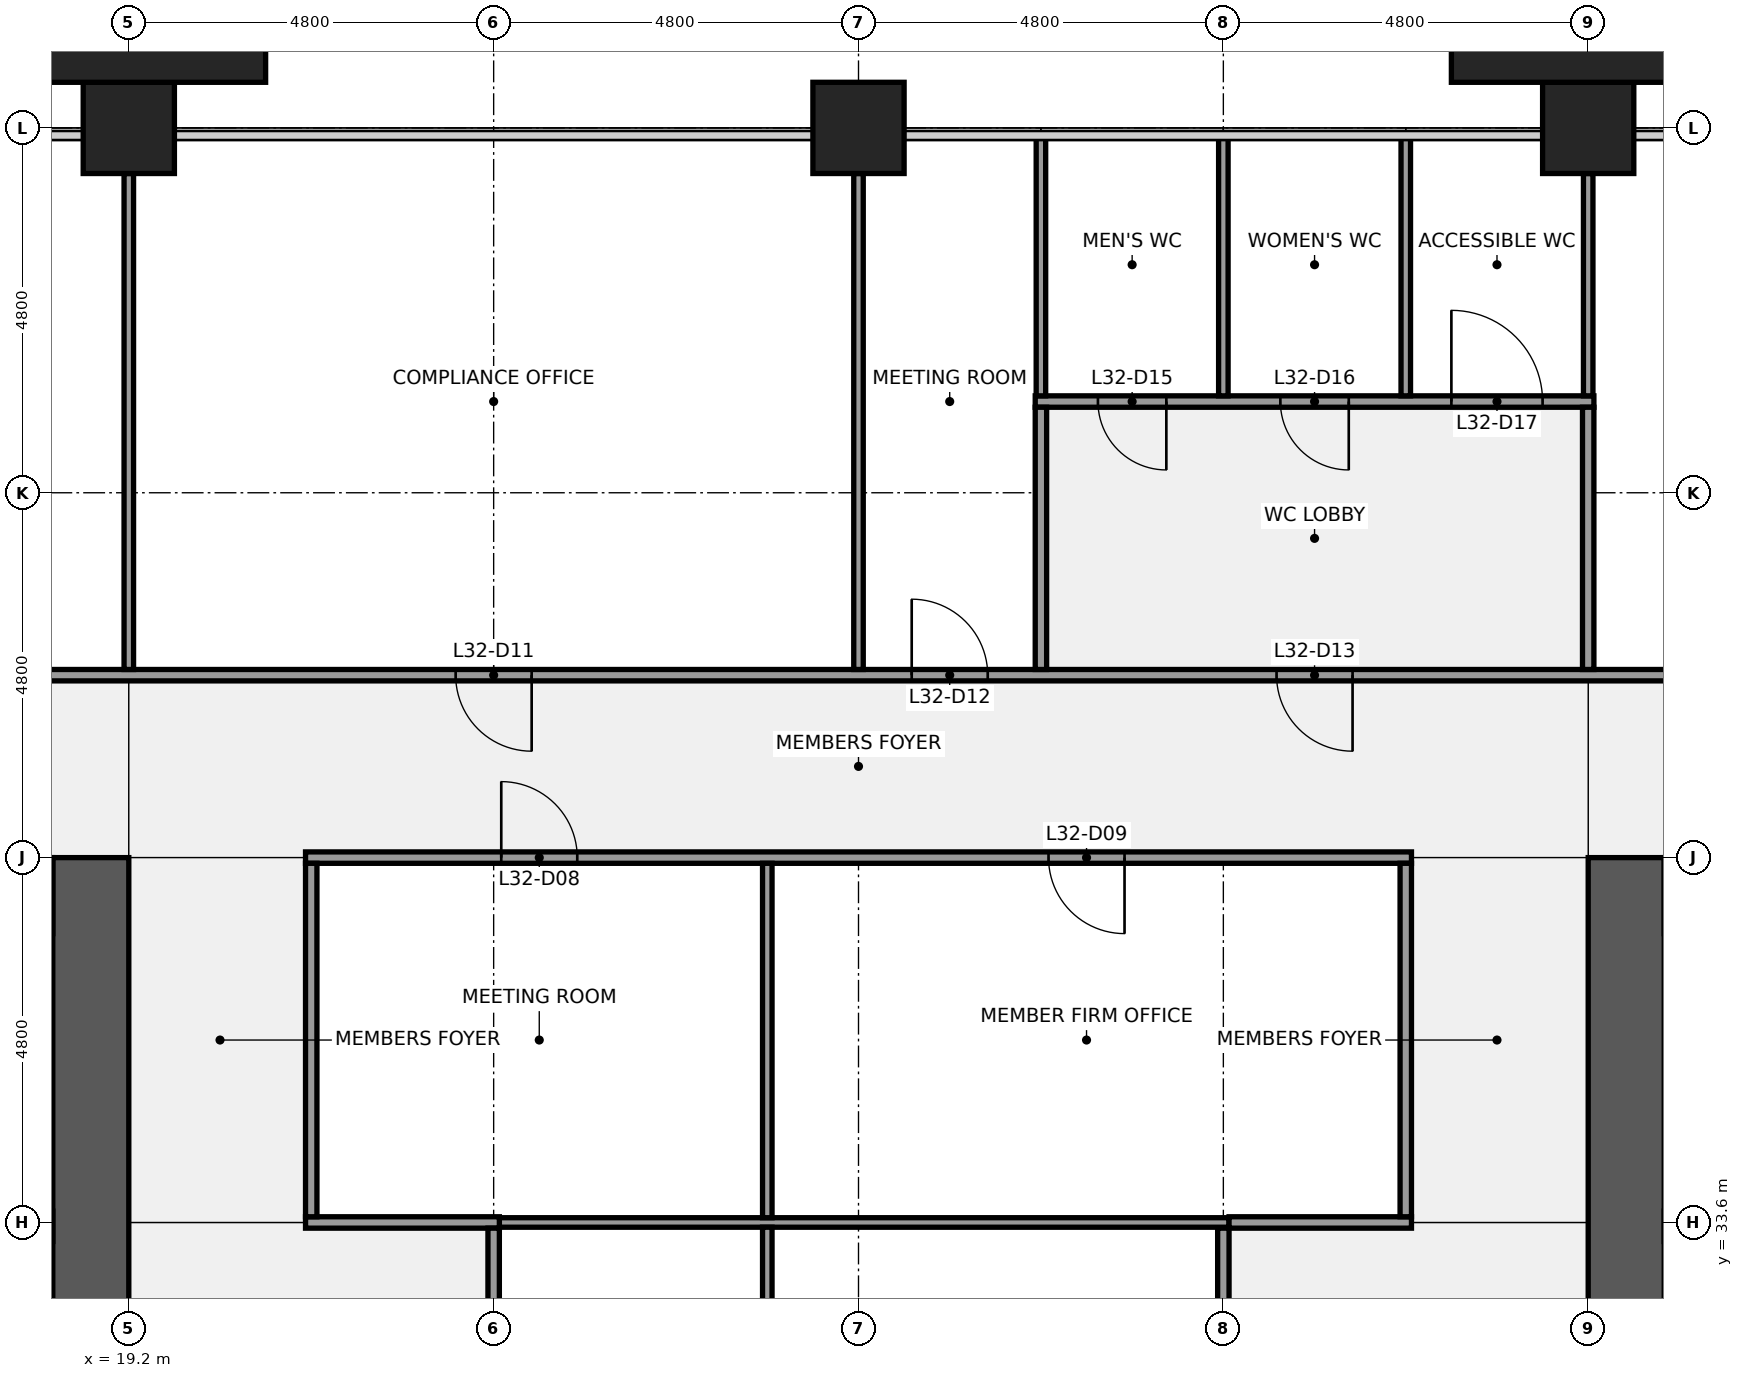
"""IFC4 building model, lengths in metres.
Left out: names, types, materials, properties, quantities, classifications, styles, units other than length and angle.
Written with IfcOpenShell. Run it as: python <this file> out.ifc"""

import sys

from ifc_helpers import new_model, si_unit, direction, frame, frame_2d, origin, origin_2d, place, context, subcontext, project, spatial, rectangle, extrude, element, fill, save


model = new_model("IFC4")
c1 = context("Model", 3, precision=1e-05, world=origin(), true_north=direction((0.0, 1.0)))
c2 = subcontext(c1, "Body", "Model", "MODEL_VIEW")
j1 = project(units=[si_unit("LENGTHUNIT", "METRE"), si_unit("PLANEANGLEUNIT", "RADIAN")], contexts=[c1])
p1 = place(None, origin())
s1 = spatial("IfcSite", under=j1, at=p1, CompositionType="ELEMENT")
p2 = place(p1, origin())
s2 = spatial("IfcBuilding", under=s1, at=p2, CompositionType="ELEMENT")
p3 = place(p2, frame((0.0, 0.0, 148.1)))
s3 = spatial("IfcBuildingStorey", under=s2, at=p3, CompositionType="ELEMENT", Elevation=148.1)
for number, where, z_axis, x_axis in (
    (1, (19.2, 48.0, 0.0), (0.0, 0.0, 1.0), (1.0, 0.0, 0.0)),
    (2, (28.8, 48.0, 0.0), (0.0, 0.0, 1.0), (1.0, 0.0, 0.0)),
    (3, (38.4, 48.0, 0.0), (0.0, 0.0, 1.0), (1.0, 0.0, 0.0)),
):
    element("IfcColumn", number, at=place(p3, frame(where, z_axis=z_axis, x_axis=x_axis)), inside=s3, PredefinedType="COLUMN", context=c2, shape_type="SweptSolid", body=[
        extrude(rectangle(XDim=1.2, YDim=1.2, at=origin_2d()), origin(), (0.0, 0.0, 1.0), 4.0),
    ])
p4 = place(p3, frame((18.7, 38.4, 0.0), z_axis=(0.0, 0.0, 1.0), x_axis=(0.0, -1.0, 0.0)))
e4 = element("IfcWall", 4, at=p4, inside=s3, PredefinedType="SHEAR", context=c2, shape_type="SweptSolid", body=[
    extrude(rectangle(XDim=28.8, YDim=1.0, at=frame_2d((14.4, 0.0))), origin(), (0.0, 0.0, 1.0), 3.84),
])
p5 = place(p4, frame((18.3, 0.0, 0.0)))
e5 = element("IfcOpeningElement", 5, at=p5, cuts=e4, PredefinedType="OPENING", context=c2, shape_type="SweptSolid", body=[
    extrude(rectangle(XDim=1.8, YDim=2.1, at=frame_2d((0.9, 1.05))), frame((0.0, 0.51, 0.0), z_axis=(0.0, -1.0, 0.0), x_axis=(1.0, 0.0, 0.0)), (0.0, 0.0, 1.0), 1.02),
])
p6 = place(p4, frame((8.7, 0.0, 0.0)))
e6 = element("IfcOpeningElement", 6, at=p6, cuts=e4, PredefinedType="OPENING", context=c2, shape_type="SweptSolid", body=[
    extrude(rectangle(XDim=1.8, YDim=2.1, at=frame_2d((0.9, 1.05))), frame((0.0, 0.51, 0.0), z_axis=(0.0, -1.0, 0.0), x_axis=(1.0, 0.0, 0.0)), (0.0, 0.0, 1.0), 1.02),
])
p7 = place(p3, frame((1.0, 33.55, 0.0), z_axis=(0.0, 0.0, 1.0), x_axis=(1.0, 0.0, 0.0)))
e7 = element("IfcWall", 7, at=p7, inside=s3, PredefinedType="SHEAR", context=c2, shape_type="SweptSolid", body=[
    extrude(rectangle(XDim=17.2, YDim=0.4, at=frame_2d((8.6, 0.0))), origin(), (0.0, 0.0, 1.0), 3.84),
])
p8 = place(p3, frame((38.9, 9.6, 0.0), z_axis=(0.0, 0.0, 1.0), x_axis=(0.0, 1.0, 0.0)))
e8 = element("IfcWall", 8, at=p8, inside=s3, PredefinedType="SHEAR", context=c2, shape_type="SweptSolid", body=[
    extrude(rectangle(XDim=28.8, YDim=1.0, at=frame_2d((14.4, 0.0))), origin(), (0.0, 0.0, 1.0), 3.84),
])
p9 = place(p8, frame((8.7, 0.0, 0.0)))
e9 = element("IfcOpeningElement", 9, at=p9, cuts=e8, PredefinedType="OPENING", context=c2, shape_type="SweptSolid", body=[
    extrude(rectangle(XDim=1.8, YDim=2.1, at=frame_2d((0.9, 1.05))), frame((0.0, 0.51, 0.0), z_axis=(0.0, -1.0, 0.0), x_axis=(1.0, 0.0, 0.0)), (0.0, 0.0, 1.0), 1.02),
])
p10 = place(p8, frame((18.3, 0.0, 0.0)))
e10 = element("IfcOpeningElement", 10, at=p10, cuts=e8, PredefinedType="OPENING", context=c2, shape_type="SweptSolid", body=[
    extrude(rectangle(XDim=1.8, YDim=2.1, at=frame_2d((0.9, 1.05))), frame((0.0, 0.51, 0.0), z_axis=(0.0, -1.0, 0.0), x_axis=(1.0, 0.0, 0.0)), (0.0, 0.0, 1.0), 1.02),
])
p11 = place(p3, frame((24.075, 33.6, 0.0), z_axis=(0.0, 0.0, 1.0), x_axis=(1.0, 0.0, 0.0)))
e11 = element("IfcWall", 11, at=p11, inside=s3, PredefinedType="PARTITIONING", context=c2, shape_type="SweptSolid", body=[
    extrude(rectangle(XDim=9.6, YDim=0.125, at=frame_2d((4.8, 0.0))), origin(), (0.0, 0.0, 1.0), 2.849),
])
p12 = place(p3, frame((21.525, 33.6, 0.0), z_axis=(0.0, 0.0, 1.0), x_axis=(1.0, 0.0, 0.0)))
e12 = element("IfcWall", 12, at=p12, inside=s3, PredefinedType="PARTITIONING", context=c2, shape_type="SweptSolid", body=[
    extrude(rectangle(XDim=2.55, YDim=0.15, at=frame_2d((1.275, 0.0))), origin(), (0.0, 0.0, 1.0), 2.849),
])
p13 = place(p3, frame((33.675, 33.6, 0.0), z_axis=(0.0, 0.0, 1.0), x_axis=(1.0, 0.0, 0.0)))
e13 = element("IfcWall", 13, at=p13, inside=s3, PredefinedType="PARTITIONING", context=c2, shape_type="SweptSolid", body=[
    extrude(rectangle(XDim=2.4, YDim=0.15, at=frame_2d((1.2, 0.0))), origin(), (0.0, 0.0, 1.0), 2.849),
])
p14 = place(p3, frame((21.525, 38.4, 0.0), z_axis=(0.0, 0.0, 1.0), x_axis=(1.0, 0.0, 0.0)))
e14 = element("IfcWall", 14, at=p14, inside=s3, PredefinedType="PARTITIONING", context=c2, shape_type="SweptSolid", body=[
    extrude(rectangle(XDim=14.55, YDim=0.15, at=frame_2d((7.275, 0.0))), origin(), (0.0, 0.0, 1.0), 2.849),
])
p15 = place(p14, frame((2.575, 0.0, 0.0)))
e15 = element("IfcOpeningElement", 15, at=p15, cuts=e14, PredefinedType="OPENING", context=c2, shape_type="SweptSolid", body=[
    extrude(rectangle(XDim=1.0, YDim=2.1, at=frame_2d((0.5, 1.05))), frame((0.0, 0.085, 0.0), z_axis=(0.0, -1.0, 0.0), x_axis=(1.0, 0.0, 0.0)), (0.0, 0.0, 1.0), 0.17),
])
p16 = place(p14, frame((9.775, 0.0, 0.0)))
e16 = element("IfcOpeningElement", 16, at=p16, cuts=e14, PredefinedType="OPENING", context=c2, shape_type="SweptSolid", body=[
    extrude(rectangle(XDim=1.0, YDim=2.1, at=frame_2d((0.5, 1.05))), frame((0.0, 0.085, 0.0), z_axis=(0.0, -1.0, 0.0), x_axis=(1.0, 0.0, 0.0)), (0.0, 0.0, 1.0), 0.17),
])
p17 = place(p3, frame((14.325, 40.8, 0.0), z_axis=(0.0, 0.0, 1.0), x_axis=(1.0, 0.0, 0.0)))
e17 = element("IfcWall", 17, at=p17, inside=s3, PredefinedType="PARTITIONING", context=c2, shape_type="SweptSolid", body=[
    extrude(rectangle(XDim=28.95, YDim=0.15, at=frame_2d((14.475, 0.0))), origin(), (0.0, 0.0, 1.0), 2.849),
])
p18 = place(p17, frame((1.975, 0.0, 0.0)))
e18 = element("IfcOpeningElement", 18, at=p18, cuts=e17, PredefinedType="OPENING", context=c2, shape_type="SweptSolid", body=[
    extrude(rectangle(XDim=1.0, YDim=2.1, at=frame_2d((0.5, 1.05))), frame((0.0, 0.085, 0.0), z_axis=(0.0, -1.0, 0.0), x_axis=(1.0, 0.0, 0.0)), (0.0, 0.0, 1.0), 0.17),
])
p19 = place(p17, frame((9.175, 0.0, 0.0)))
e19 = element("IfcOpeningElement", 19, at=p19, cuts=e17, PredefinedType="OPENING", context=c2, shape_type="SweptSolid", body=[
    extrude(rectangle(XDim=1.0, YDim=2.1, at=frame_2d((0.5, 1.05))), frame((0.0, 0.085, 0.0), z_axis=(0.0, -1.0, 0.0), x_axis=(1.0, 0.0, 0.0)), (0.0, 0.0, 1.0), 0.17),
])
p20 = place(p17, frame((15.175, 0.0, 0.0)))
e20 = element("IfcOpeningElement", 20, at=p20, cuts=e17, PredefinedType="OPENING", context=c2, shape_type="SweptSolid", body=[
    extrude(rectangle(XDim=1.0, YDim=2.1, at=frame_2d((0.5, 1.05))), frame((0.0, 0.085, 0.0), z_axis=(0.0, -1.0, 0.0), x_axis=(1.0, 0.0, 0.0)), (0.0, 0.0, 1.0), 0.17),
])
p21 = place(p17, frame((19.975, 0.0, 0.0)))
e21 = element("IfcOpeningElement", 21, at=p21, cuts=e17, PredefinedType="OPENING", context=c2, shape_type="SweptSolid", body=[
    extrude(rectangle(XDim=1.0, YDim=2.1, at=frame_2d((0.5, 1.05))), frame((0.0, 0.085, 0.0), z_axis=(0.0, -1.0, 0.0), x_axis=(1.0, 0.0, 0.0)), (0.0, 0.0, 1.0), 0.17),
])
p22 = place(p17, frame((25.975, 0.0, 0.0)))
e22 = element("IfcOpeningElement", 22, at=p22, cuts=e17, PredefinedType="OPENING", context=c2, shape_type="SweptSolid", body=[
    extrude(rectangle(XDim=1.0, YDim=2.1, at=frame_2d((0.5, 1.05))), frame((0.0, 0.085, 0.0), z_axis=(0.0, -1.0, 0.0), x_axis=(1.0, 0.0, 0.0)), (0.0, 0.0, 1.0), 0.17),
])
p23 = place(p3, frame((31.125, 44.4, 0.0), z_axis=(0.0, 0.0, 1.0), x_axis=(1.0, 0.0, 0.0)))
e23 = element("IfcWall", 23, at=p23, inside=s3, PredefinedType="PARTITIONING", context=c2, shape_type="SweptSolid", body=[
    extrude(rectangle(XDim=7.35, YDim=0.15, at=frame_2d((3.675, 0.0))), origin(), (0.0, 0.0, 1.0), 2.849),
])
p24 = place(p23, frame((0.825, 0.0, 0.0)))
e24 = element("IfcOpeningElement", 24, at=p24, cuts=e23, PredefinedType="OPENING", context=c2, shape_type="SweptSolid", body=[
    extrude(rectangle(XDim=0.9, YDim=2.1, at=frame_2d((0.45, 1.05))), frame((0.0, 0.085, 0.0), z_axis=(0.0, -1.0, 0.0), x_axis=(1.0, 0.0, 0.0)), (0.0, 0.0, 1.0), 0.17),
])
p25 = place(p23, frame((3.225, 0.0, 0.0)))
e25 = element("IfcOpeningElement", 25, at=p25, cuts=e23, PredefinedType="OPENING", context=c2, shape_type="SweptSolid", body=[
    extrude(rectangle(XDim=0.9, YDim=2.1, at=frame_2d((0.45, 1.05))), frame((0.0, 0.085, 0.0), z_axis=(0.0, -1.0, 0.0), x_axis=(1.0, 0.0, 0.0)), (0.0, 0.0, 1.0), 0.17),
])
p26 = place(p23, frame((5.475, 0.0, 0.0)))
e26 = element("IfcOpeningElement", 26, at=p26, cuts=e23, PredefinedType="OPENING", context=c2, shape_type="SweptSolid", body=[
    extrude(rectangle(XDim=1.2, YDim=2.1, at=frame_2d((0.6, 1.05))), frame((0.0, 0.085, 0.0), z_axis=(0.0, -1.0, 0.0), x_axis=(1.0, 0.0, 0.0)), (0.0, 0.0, 1.0), 0.17),
])
p27 = place(p3, frame((19.2, 40.875, 0.0), z_axis=(0.0, 0.0, 1.0), x_axis=(0.0, 1.0, 0.0)))
e27 = element("IfcWall", 27, at=p27, inside=s3, PredefinedType="PARTITIONING", context=c2, shape_type="SweptSolid", body=[
    extrude(rectangle(XDim=6.525, YDim=0.125, at=frame_2d((3.262, 0.0))), origin(), (0.0, 0.0, 1.0), 2.849),
])
p28 = place(p3, frame((21.6, 33.675, 0.0), z_axis=(0.0, 0.0, 1.0), x_axis=(0.0, 1.0, 0.0)))
e28 = element("IfcWall", 28, at=p28, inside=s3, PredefinedType="PARTITIONING", context=c2, shape_type="SweptSolid", body=[
    extrude(rectangle(XDim=4.65, YDim=0.15, at=frame_2d((2.325, 0.0))), origin(), (0.0, 0.0, 1.0), 2.849),
])
p29 = place(p3, frame((24.0, 21.675, 0.0), z_axis=(0.0, 0.0, 1.0), x_axis=(0.0, 1.0, 0.0)))
e29 = element("IfcWall", 29, at=p29, inside=s3, PredefinedType="PARTITIONING", context=c2, shape_type="SweptSolid", body=[
    extrude(rectangle(XDim=11.85, YDim=0.15, at=frame_2d((5.925, 0.0))), origin(), (0.0, 0.0, 1.0), 2.849),
])
p30 = place(p29, frame((5.425, 0.0, 0.0)))
e30 = element("IfcOpeningElement", 30, at=p30, cuts=e29, PredefinedType="OPENING", context=c2, shape_type="SweptSolid", body=[
    extrude(rectangle(XDim=1.0, YDim=2.1, at=frame_2d((0.5, 1.05))), frame((0.0, 0.085, 0.0), z_axis=(0.0, -1.0, 0.0), x_axis=(1.0, 0.0, 0.0)), (0.0, 0.0, 1.0), 0.17),
])
p31 = place(p3, frame((27.6, 21.675, 0.0), z_axis=(0.0, 0.0, 1.0), x_axis=(0.0, 1.0, 0.0)))
e31 = element("IfcWall", 31, at=p31, inside=s3, PredefinedType="PARTITIONING", context=c2, shape_type="SweptSolid", body=[
    extrude(rectangle(XDim=11.863, YDim=0.125, at=frame_2d((5.931, 0.0))), origin(), (0.0, 0.0, 1.0), 2.849),
])
p32 = place(p3, frame((27.6, 33.663, 0.0), z_axis=(0.0, 0.0, 1.0), x_axis=(0.0, 1.0, 0.0)))
e32 = element("IfcWall", 32, at=p32, inside=s3, PredefinedType="PARTITIONING", context=c2, shape_type="SweptSolid", body=[
    extrude(rectangle(XDim=4.662, YDim=0.125, at=frame_2d((2.331, 0.0))), origin(), (0.0, 0.0, 1.0), 2.849),
])
p33 = place(p3, frame((28.8, 40.875, 0.0), z_axis=(0.0, 0.0, 1.0), x_axis=(0.0, 1.0, 0.0)))
e33 = element("IfcWall", 33, at=p33, inside=s3, PredefinedType="PARTITIONING", context=c2, shape_type="SweptSolid", body=[
    extrude(rectangle(XDim=6.525, YDim=0.125, at=frame_2d((3.262, 0.0))), origin(), (0.0, 0.0, 1.0), 2.849),
])
p34 = place(p3, frame((31.2, 44.475, 0.0), z_axis=(0.0, 0.0, 1.0), x_axis=(0.0, 1.0, 0.0)))
e34 = element("IfcWall", 34, at=p34, inside=s3, PredefinedType="PARTITIONING", context=c2, shape_type="SweptSolid", body=[
    extrude(rectangle(XDim=3.425, YDim=0.125, at=frame_2d((1.712, 0.0))), origin(), (0.0, 0.0, 1.0), 2.849),
])
p35 = place(p3, frame((31.2, 40.875, 0.0), z_axis=(0.0, 0.0, 1.0), x_axis=(0.0, 1.0, 0.0)))
e35 = element("IfcWall", 35, at=p35, inside=s3, PredefinedType="PARTITIONING", context=c2, shape_type="SweptSolid", body=[
    extrude(rectangle(XDim=3.45, YDim=0.15, at=frame_2d((1.725, 0.0))), origin(), (0.0, 0.0, 1.0), 2.849),
])
p36 = place(p3, frame((33.6, 44.475, 0.0), z_axis=(0.0, 0.0, 1.0), x_axis=(0.0, 1.0, 0.0)))
e36 = element("IfcWall", 36, at=p36, inside=s3, PredefinedType="PARTITIONING", context=c2, shape_type="SweptSolid", body=[
    extrude(rectangle(XDim=3.425, YDim=0.125, at=frame_2d((1.712, 0.0))), origin(), (0.0, 0.0, 1.0), 2.849),
])
p37 = place(p3, frame((33.6, 21.675, 0.0), z_axis=(0.0, 0.0, 1.0), x_axis=(0.0, 1.0, 0.0)))
e37 = element("IfcWall", 37, at=p37, inside=s3, PredefinedType="PARTITIONING", context=c2, shape_type="SweptSolid", body=[
    extrude(rectangle(XDim=11.85, YDim=0.15, at=frame_2d((5.925, 0.0))), origin(), (0.0, 0.0, 1.0), 2.849),
])
p38 = place(p37, frame((5.425, 0.0, 0.0)))
e38 = element("IfcOpeningElement", 38, at=p38, cuts=e37, PredefinedType="OPENING", context=c2, shape_type="SweptSolid", body=[
    extrude(rectangle(XDim=1.0, YDim=2.1, at=frame_2d((0.5, 1.05))), frame((0.0, 0.085, 0.0), z_axis=(0.0, -1.0, 0.0), x_axis=(1.0, 0.0, 0.0)), (0.0, 0.0, 1.0), 0.17),
])
p39 = place(p3, frame((36.0, 44.475, 0.0), z_axis=(0.0, 0.0, 1.0), x_axis=(0.0, 1.0, 0.0)))
e39 = element("IfcWall", 39, at=p39, inside=s3, PredefinedType="PARTITIONING", context=c2, shape_type="SweptSolid", body=[
    extrude(rectangle(XDim=3.425, YDim=0.125, at=frame_2d((1.712, 0.0))), origin(), (0.0, 0.0, 1.0), 2.849),
])
p40 = place(p3, frame((36.0, 33.675, 0.0), z_axis=(0.0, 0.0, 1.0), x_axis=(0.0, 1.0, 0.0)))
e40 = element("IfcWall", 40, at=p40, inside=s3, PredefinedType="PARTITIONING", context=c2, shape_type="SweptSolid", body=[
    extrude(rectangle(XDim=4.65, YDim=0.15, at=frame_2d((2.325, 0.0))), origin(), (0.0, 0.0, 1.0), 2.849),
])
p41 = place(p3, frame((38.4, 44.475, 0.0), z_axis=(0.0, 0.0, 1.0), x_axis=(0.0, 1.0, 0.0)))
e41 = element("IfcWall", 41, at=p41, inside=s3, PredefinedType="PARTITIONING", context=c2, shape_type="SweptSolid", body=[
    extrude(rectangle(XDim=2.925, YDim=0.125, at=frame_2d((1.462, 0.0))), origin(), (0.0, 0.0, 1.0), 2.849),
])
p42 = place(p3, frame((38.4, 40.875, 0.0), z_axis=(0.0, 0.0, 1.0), x_axis=(0.0, 1.0, 0.0)))
e42 = element("IfcWall", 42, at=p42, inside=s3, PredefinedType="PARTITIONING", context=c2, shape_type="SweptSolid", body=[
    extrude(rectangle(XDim=3.45, YDim=0.15, at=frame_2d((1.725, 0.0))), origin(), (0.0, 0.0, 1.0), 2.849),
])
for number, where, z_axis, x_axis in (
    (43, (19.2, 49.05, 0.0), (0.0, 0.0, 1.0), (1.0, 0.0, 0.0)),
    (44, (38.4, 49.05, 0.0), (0.0, 0.0, 1.0), (1.0, 0.0, 0.0)),
):
    element("IfcColumn", number, at=place(p3, frame(where, z_axis=z_axis, x_axis=x_axis)), inside=s3, PredefinedType="PILASTER", context=c2, shape_type="SweptSolid", body=[
        extrude(rectangle(XDim=3.6, YDim=0.9, at=origin_2d()), origin(), (0.0, 0.0, 1.0), 4.0),
    ])
p43 = place(p15, origin())
e45 = element("IfcDoor", 45, at=p43, inside=s3, OperationType="SINGLE_SWING_LEFT", PredefinedType="DOOR", context=c2, shape_type="SweptSolid", body=[
    extrude(rectangle(XDim=1.0, YDim=2.1, at=frame_2d((0.5, 1.05))), frame((0.0, 0.025, 0.0), z_axis=(0.0, -1.0, 0.0), x_axis=(1.0, 0.0, 0.0)), (0.0, 0.0, 1.0), 0.05),
])
fill(e15, e45)
p44 = place(p16, origin())
e46 = element("IfcDoor", 46, at=p44, inside=s3, OperationType="SINGLE_SWING_RIGHT", PredefinedType="DOOR", context=c2, shape_type="SweptSolid", body=[
    extrude(rectangle(XDim=1.0, YDim=2.1, at=frame_2d((0.5, 1.05))), frame((0.0, 0.025, 0.0), z_axis=(0.0, -1.0, 0.0), x_axis=(1.0, 0.0, 0.0)), (0.0, 0.0, 1.0), 0.05),
])
fill(e16, e46)
p45 = place(p19, origin())
e47 = element("IfcDoor", 47, at=p45, inside=s3, OperationType="SINGLE_SWING_RIGHT", PredefinedType="DOOR", context=c2, shape_type="SweptSolid", body=[
    extrude(rectangle(XDim=1.0, YDim=2.1, at=frame_2d((0.5, 1.05))), frame((0.0, 0.025, 0.0), z_axis=(0.0, -1.0, 0.0), x_axis=(1.0, 0.0, 0.0)), (0.0, 0.0, 1.0), 0.05),
])
fill(e19, e47)
p46 = place(p20, origin())
e48 = element("IfcDoor", 48, at=p46, inside=s3, OperationType="SINGLE_SWING_LEFT", PredefinedType="DOOR", context=c2, shape_type="SweptSolid", body=[
    extrude(rectangle(XDim=1.0, YDim=2.1, at=frame_2d((0.5, 1.05))), frame((0.0, 0.025, 0.0), z_axis=(0.0, -1.0, 0.0), x_axis=(1.0, 0.0, 0.0)), (0.0, 0.0, 1.0), 0.05),
])
fill(e20, e48)
p47 = place(p21, origin())
e49 = element("IfcDoor", 49, at=p47, inside=s3, OperationType="SINGLE_SWING_RIGHT", PredefinedType="DOOR", context=c2, shape_type="SweptSolid", body=[
    extrude(rectangle(XDim=1.0, YDim=2.1, at=frame_2d((0.5, 1.05))), frame((0.0, 0.025, 0.0), z_axis=(0.0, -1.0, 0.0), x_axis=(1.0, 0.0, 0.0)), (0.0, 0.0, 1.0), 0.05),
])
fill(e21, e49)
p48 = place(p24, origin())
e50 = element("IfcDoor", 50, at=p48, inside=s3, OperationType="SINGLE_SWING_RIGHT", PredefinedType="DOOR", context=c2, shape_type="SweptSolid", body=[
    extrude(rectangle(XDim=0.9, YDim=2.1, at=frame_2d((0.45, 1.05))), frame((0.0, 0.025, 0.0), z_axis=(0.0, -1.0, 0.0), x_axis=(1.0, 0.0, 0.0)), (0.0, 0.0, 1.0), 0.05),
])
fill(e24, e50)
p49 = place(p25, origin())
e51 = element("IfcDoor", 51, at=p49, inside=s3, OperationType="SINGLE_SWING_RIGHT", PredefinedType="DOOR", context=c2, shape_type="SweptSolid", body=[
    extrude(rectangle(XDim=0.9, YDim=2.1, at=frame_2d((0.45, 1.05))), frame((0.0, 0.025, 0.0), z_axis=(0.0, -1.0, 0.0), x_axis=(1.0, 0.0, 0.0)), (0.0, 0.0, 1.0), 0.05),
])
fill(e25, e51)
p50 = place(p26, origin())
e52 = element("IfcDoor", 52, at=p50, inside=s3, OperationType="SINGLE_SWING_LEFT", PredefinedType="DOOR", context=c2, shape_type="SweptSolid", body=[
    extrude(rectangle(XDim=1.2, YDim=2.1, at=frame_2d((0.6, 1.05))), frame((0.0, 0.025, 0.0), z_axis=(0.0, -1.0, 0.0), x_axis=(1.0, 0.0, 0.0)), (0.0, 0.0, 1.0), 0.05),
])
fill(e26, e52)
save(model, sys.argv[1])
